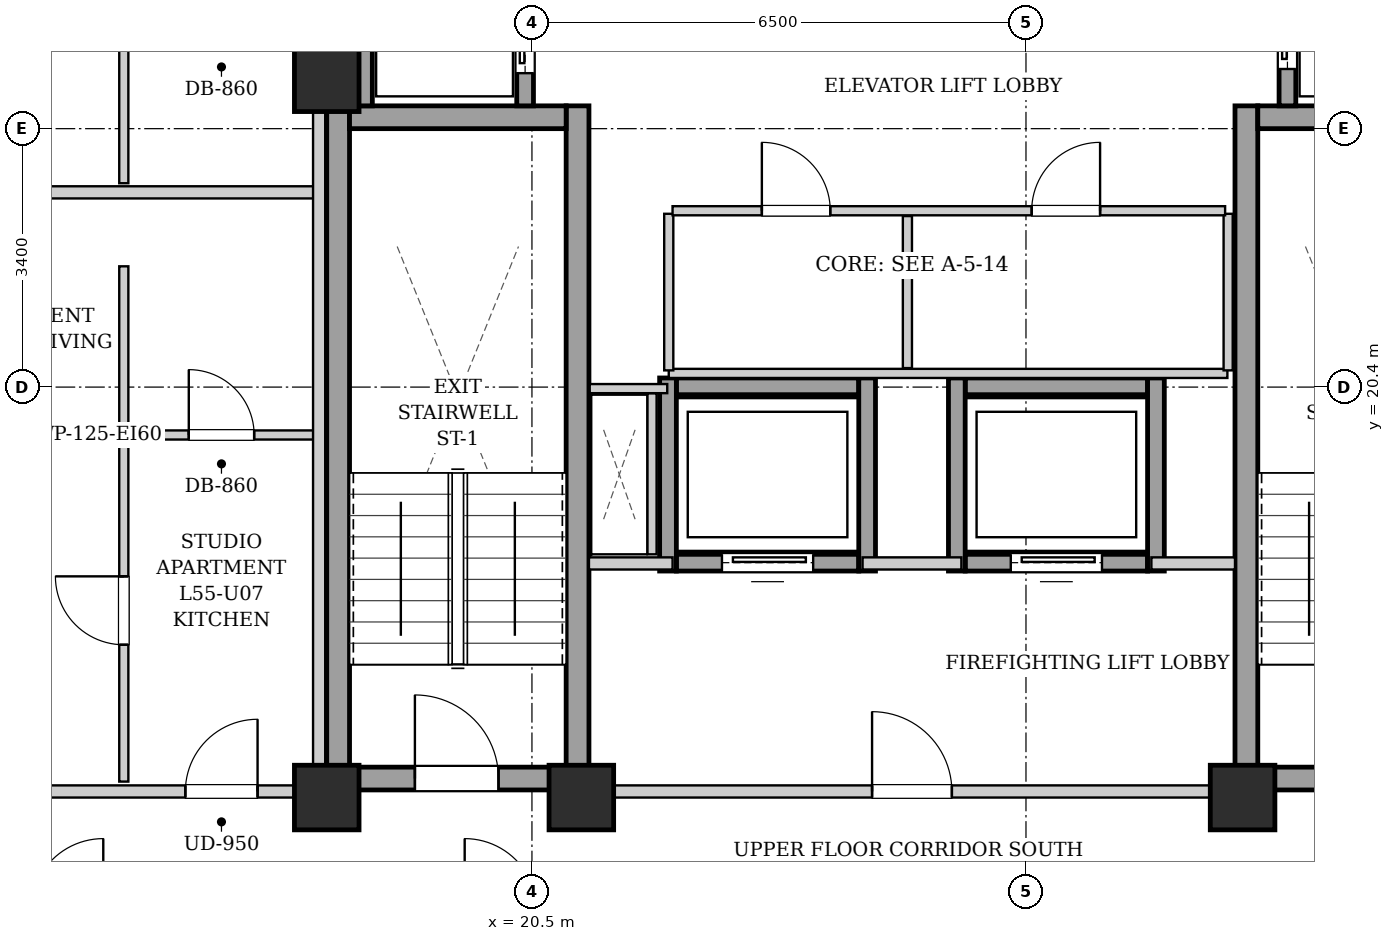
"""IFC4 building model, lengths in metres.
Left out: names, types, materials, properties, quantities, classifications, styles, units other than length and angle.
Written with IfcOpenShell. Run it as: python <this file> out.ifc"""

import sys

from ifc_helpers import new_model, si_unit, direction, frame, frame_2d, origin, origin_2d, place, context, subcontext, project, spatial, rectangle, extrude, element, fill, save


model = new_model("IFC4")
c1 = context("Model", 3, precision=1e-05, world=origin(), true_north=direction((0.0, 1.0)))
c2 = subcontext(c1, "Body", "Model", "MODEL_VIEW")
j1 = project(units=[si_unit("LENGTHUNIT", "METRE"), si_unit("PLANEANGLEUNIT", "RADIAN")], contexts=[c1])
p1 = place(None, origin())
s1 = spatial("IfcSite", under=j1, at=p1, CompositionType="ELEMENT")
p2 = place(p1, origin())
s2 = spatial("IfcBuilding", under=s1, at=p2, CompositionType="ELEMENT")
p3 = place(p2, frame((0.0, 0.0, 190.9)))
s3 = spatial("IfcBuildingStorey", under=s2, at=p3, CompositionType="ELEMENT", Elevation=190.9)
for number, where, z_axis, x_axis in (
    (1, (17.8, 15.0, 0.0), (0.0, 0.0, 1.0), (1.0, 0.0, 0.0)),
    (2, (21.15, 15.0, 0.0), (0.0, 0.0, 1.0), (1.0, 0.0, 0.0)),
    (3, (29.85, 15.0, 0.0), (0.0, 0.0, 1.0), (1.0, 0.0, 0.0)),
    (4, (17.8, 24.45, 0.0), (0.0, 0.0, 1.0), (1.0, 0.0, 0.0)),
):
    element("IfcColumn", number, at=place(p3, frame(where, z_axis=z_axis, x_axis=x_axis)), inside=s3, PredefinedType="COLUMN", context=c2, shape_type="SweptSolid", body=[
        extrude(rectangle(XDim=0.85, YDim=0.85, at=origin_2d()), origin(), (0.0, 0.0, 1.0), 3.3),
    ])
for number, where, z_axis, x_axis in (
    (5, (17.95, 15.1, 0.0), (0.0, 0.0, 1.0), (0.0, 1.0, 0.0)),
    (6, (21.1, 15.1, 0.0), (0.0, 0.0, 1.0), (0.0, 1.0, 0.0)),
):
    element("IfcWall", number, at=place(p3, frame(where, z_axis=z_axis, x_axis=x_axis)), inside=s3, PredefinedType="SHEAR", context=c2, shape_type="SweptSolid", body=[
        extrude(rectangle(XDim=9.0, YDim=0.3, at=frame_2d((4.5, 0.0))), origin(), (0.0, 0.0, 1.0), 3.04),
    ])
p4 = place(p3, frame((18.1, 23.95, 0.0), z_axis=(0.0, 0.0, 1.0), x_axis=(1.0, 0.0, 0.0)))
e7 = element("IfcWall", 7, at=p4, inside=s3, PredefinedType="SHEAR", context=c2, shape_type="SweptSolid", body=[
    extrude(rectangle(XDim=2.85, YDim=0.3, at=frame_2d((1.425, 0.0))), origin(), (0.0, 0.0, 1.0), 3.04),
])
p5 = place(p3, frame((18.1, 15.25, 0.0), z_axis=(0.0, 0.0, 1.0), x_axis=(1.0, 0.0, 0.0)))
e8 = element("IfcWall", 8, at=p5, inside=s3, PredefinedType="SHEAR", context=c2, shape_type="SweptSolid", body=[
    extrude(rectangle(XDim=2.85, YDim=0.3, at=frame_2d((1.425, 0.0))), origin(), (0.0, 0.0, 1.0), 3.04),
])
p6 = place(p5, frame((0.86, 0.0, 0.0)))
e9 = element("IfcOpeningElement", 9, at=p6, cuts=e8, PredefinedType="OPENING", context=c2, shape_type="SweptSolid", body=[
    extrude(rectangle(XDim=1.1, YDim=2.05, at=frame_2d((0.55, 1.025))), frame((0.0, 0.16, 0.0), z_axis=(0.0, -1.0, 0.0), x_axis=(1.0, 0.0, 0.0)), (0.0, 0.0, 1.0), 0.32),
])
p7 = place(p3, frame((29.9, 15.1, 0.0), z_axis=(0.0, 0.0, 1.0), x_axis=(0.0, 1.0, 0.0)))
e10 = element("IfcWall", 10, at=p7, inside=s3, PredefinedType="SHEAR", context=c2, shape_type="SweptSolid", body=[
    extrude(rectangle(XDim=9.0, YDim=0.3, at=frame_2d((4.5, 0.0))), origin(), (0.0, 0.0, 1.0), 3.04),
])
p8 = place(p3, frame((30.05, 23.95, 0.0), z_axis=(0.0, 0.0, 1.0), x_axis=(1.0, 0.0, 0.0)))
e11 = element("IfcWall", 11, at=p8, inside=s3, PredefinedType="SHEAR", context=c2, shape_type="SweptSolid", body=[
    extrude(rectangle(XDim=2.85, YDim=0.3, at=frame_2d((1.425, 0.0))), origin(), (0.0, 0.0, 1.0), 3.04),
])
p9 = place(p3, frame((30.05, 15.25, 0.0), z_axis=(0.0, 0.0, 1.0), x_axis=(1.0, 0.0, 0.0)))
e12 = element("IfcWall", 12, at=p9, inside=s3, PredefinedType="SHEAR", context=c2, shape_type="SweptSolid", body=[
    extrude(rectangle(XDim=2.85, YDim=0.3, at=frame_2d((1.425, 0.0))), origin(), (0.0, 0.0, 1.0), 3.04),
])
p10 = place(p9, frame((0.86, 0.0, 0.0)))
e13 = element("IfcOpeningElement", 13, at=p10, cuts=e12, PredefinedType="OPENING", context=c2, shape_type="SweptSolid", body=[
    extrude(rectangle(XDim=1.1, YDim=2.05, at=frame_2d((0.55, 1.025))), frame((0.0, 0.16, 0.0), z_axis=(0.0, -1.0, 0.0), x_axis=(1.0, 0.0, 0.0)), (0.0, 0.0, 1.0), 0.32),
])
p11 = place(p3, frame((18.29, 24.1, 0.0), z_axis=(0.0, 0.0, 1.0), x_axis=(0.0, 1.0, 0.0)))
e14 = element("IfcWall", 14, at=p11, inside=s3, PredefinedType="SHEAR", context=c2, shape_type="SweptSolid", body=[
    extrude(rectangle(XDim=4.14, YDim=0.22, at=frame_2d((2.07, 0.0))), origin(), (0.0, 0.0, 1.0), 3.04),
])
p12 = place(p3, frame((20.41, 24.1, 0.0), z_axis=(0.0, 0.0, 1.0), x_axis=(0.0, 1.0, 0.0)))
e15 = element("IfcWall", 15, at=p12, inside=s3, PredefinedType="SHEAR", context=c2, shape_type="SweptSolid", body=[
    extrude(rectangle(XDim=1.96, YDim=0.22, at=frame_2d((0.98, 0.0))), origin(), (0.0, 0.0, 1.0), 3.04),
])
p13 = place(p12, frame((0.43, 0.0, 0.0)))
e16 = element("IfcOpeningElement", 16, at=p13, cuts=e15, PredefinedType="OPENING", context=c2, shape_type="SweptSolid", body=[
    extrude(rectangle(XDim=1.1, YDim=2.15, at=frame_2d((0.55, 1.075))), frame((0.0, 0.12, 0.0), z_axis=(0.0, -1.0, 0.0), x_axis=(1.0, 0.0, 0.0)), (0.0, 0.0, 1.0), 0.24),
])
p14 = place(p3, frame((30.44, 24.1, 0.0), z_axis=(0.0, 0.0, 1.0), x_axis=(0.0, 1.0, 0.0)))
e17 = element("IfcWall", 17, at=p14, inside=s3, PredefinedType="SHEAR", context=c2, shape_type="SweptSolid", body=[
    extrude(rectangle(XDim=2.07, YDim=0.22, at=frame_2d((1.035, 0.0))), origin(), (0.0, 0.0, 1.0), 3.04),
])
p15 = place(p14, frame((0.485, 0.0, 0.0)))
e18 = element("IfcOpeningElement", 18, at=p15, cuts=e17, PredefinedType="OPENING", context=c2, shape_type="SweptSolid", body=[
    extrude(rectangle(XDim=1.1, YDim=2.15, at=frame_2d((0.55, 1.075))), frame((0.0, 0.12, 0.0), z_axis=(0.0, -1.0, 0.0), x_axis=(1.0, 0.0, 0.0)), (0.0, 0.0, 1.0), 0.24),
])
p16 = place(p3, frame((22.4, 18.09, 0.0), z_axis=(0.0, 0.0, 1.0), x_axis=(1.0, 0.0, 0.0)))
e19 = element("IfcWall", 19, at=p16, inside=s3, PredefinedType="SHEAR", context=c2, shape_type="SweptSolid", body=[
    extrude(rectangle(XDim=2.4, YDim=0.22, at=frame_2d((1.2, 0.0))), origin(), (0.0, 0.0, 1.0), 3.04),
])
p17 = place(p16, frame((0.6, 0.0, 0.0)))
e20 = element("IfcOpeningElement", 20, at=p17, cuts=e19, PredefinedType="OPENING", context=c2, shape_type="SweptSolid", body=[
    extrude(rectangle(XDim=1.2, YDim=2.15, at=frame_2d((0.6, 1.075))), frame((0.0, 0.12, 0.0), z_axis=(0.0, -1.0, 0.0), x_axis=(1.0, 0.0, 0.0)), (0.0, 0.0, 1.0), 0.24),
])
p18 = place(p3, frame((22.4, 20.41, 0.0), z_axis=(0.0, 0.0, 1.0), x_axis=(1.0, 0.0, 0.0)))
e21 = element("IfcWall", 21, at=p18, inside=s3, PredefinedType="SHEAR", context=c2, shape_type="SweptSolid", body=[
    extrude(rectangle(XDim=2.4, YDim=0.22, at=frame_2d((1.2, 0.0))), origin(), (0.0, 0.0, 1.0), 3.04),
])
for number, where, z_axis, x_axis in (
    (22, (22.29, 17.98, 0.0), (0.0, 0.0, 1.0), (0.0, 1.0, 0.0)),
    (23, (24.91, 17.98, 0.0), (0.0, 0.0, 1.0), (0.0, 1.0, 0.0)),
):
    element("IfcWall", number, at=place(p3, frame(where, z_axis=z_axis, x_axis=x_axis)), inside=s3, PredefinedType="SHEAR", context=c2, shape_type="SweptSolid", body=[
        extrude(rectangle(XDim=2.54, YDim=0.22, at=frame_2d((1.27, 0.0))), origin(), (0.0, 0.0, 1.0), 3.04),
    ])
p19 = place(p3, frame((26.2, 18.09, 0.0), z_axis=(0.0, 0.0, 1.0), x_axis=(1.0, 0.0, 0.0)))
e24 = element("IfcWall", 24, at=p19, inside=s3, PredefinedType="SHEAR", context=c2, shape_type="SweptSolid", body=[
    extrude(rectangle(XDim=2.4, YDim=0.22, at=frame_2d((1.2, 0.0))), origin(), (0.0, 0.0, 1.0), 3.04),
])
p20 = place(p19, frame((0.6, 0.0, 0.0)))
e25 = element("IfcOpeningElement", 25, at=p20, cuts=e24, PredefinedType="OPENING", context=c2, shape_type="SweptSolid", body=[
    extrude(rectangle(XDim=1.2, YDim=2.15, at=frame_2d((0.6, 1.075))), frame((0.0, 0.12, 0.0), z_axis=(0.0, -1.0, 0.0), x_axis=(1.0, 0.0, 0.0)), (0.0, 0.0, 1.0), 0.24),
])
p21 = place(p3, frame((26.2, 20.41, 0.0), z_axis=(0.0, 0.0, 1.0), x_axis=(1.0, 0.0, 0.0)))
e26 = element("IfcWall", 26, at=p21, inside=s3, PredefinedType="SHEAR", context=c2, shape_type="SweptSolid", body=[
    extrude(rectangle(XDim=2.4, YDim=0.22, at=frame_2d((1.2, 0.0))), origin(), (0.0, 0.0, 1.0), 3.04),
])
for number, where, z_axis, x_axis in (
    (27, (26.09, 17.98, 0.0), (0.0, 0.0, 1.0), (0.0, 1.0, 0.0)),
    (28, (28.71, 17.98, 0.0), (0.0, 0.0, 1.0), (0.0, 1.0, 0.0)),
):
    element("IfcWall", number, at=place(p3, frame(where, z_axis=z_axis, x_axis=x_axis)), inside=s3, PredefinedType="SHEAR", context=c2, shape_type="SweptSolid", body=[
        extrude(rectangle(XDim=2.54, YDim=0.22, at=frame_2d((1.27, 0.0))), origin(), (0.0, 0.0, 1.0), 3.04),
    ])
p22 = place(p3, frame((21.25, 15.08, 0.0), z_axis=(0.0, 0.0, 1.0), x_axis=(1.0, 0.0, 0.0)))
e29 = element("IfcWall", 29, at=p22, inside=s3, PredefinedType="PARTITIONING", context=c2, shape_type="SweptSolid", body=[
    extrude(rectangle(XDim=8.5, YDim=0.16, at=frame_2d((4.25, 0.0))), origin(), (0.0, 0.0, 1.0), 2.556),
])
p23 = place(p22, frame((3.725, 0.0, 0.0)))
e30 = element("IfcOpeningElement", 30, at=p23, cuts=e29, PredefinedType="OPENING", context=c2, shape_type="SweptSolid", body=[
    extrude(rectangle(XDim=1.05, YDim=2.05, at=frame_2d((0.525, 1.025))), frame((0.0, 0.09, 0.0), z_axis=(0.0, -1.0, 0.0), x_axis=(1.0, 0.0, 0.0)), (0.0, 0.0, 1.0), 0.18),
])
p24 = place(p3, frame((21.25, 18.08, 0.0), z_axis=(0.0, 0.0, 1.0), x_axis=(1.0, 0.0, 0.0)))
e31 = element("IfcWall", 31, at=p24, inside=s3, PredefinedType="PARTITIONING", context=c2, shape_type="SweptSolid", body=[
    extrude(rectangle(XDim=1.1, YDim=0.16, at=frame_2d((0.55, 0.0))), origin(), (0.0, 0.0, 1.0), 3.04),
])
p25 = place(p3, frame((24.85, 18.08, 0.0), z_axis=(0.0, 0.0, 1.0), x_axis=(1.0, 0.0, 0.0)))
e32 = element("IfcWall", 32, at=p25, inside=s3, PredefinedType="PARTITIONING", context=c2, shape_type="SweptSolid", body=[
    extrude(rectangle(XDim=1.3, YDim=0.16, at=frame_2d((0.65, 0.0))), origin(), (0.0, 0.0, 1.0), 3.04),
])
p26 = place(p3, frame((28.65, 18.08, 0.0), z_axis=(0.0, 0.0, 1.0), x_axis=(1.0, 0.0, 0.0)))
e33 = element("IfcWall", 33, at=p26, inside=s3, PredefinedType="PARTITIONING", context=c2, shape_type="SweptSolid", body=[
    extrude(rectangle(XDim=1.1, YDim=0.16, at=frame_2d((0.55, 0.0))), origin(), (0.0, 0.0, 1.0), 3.04),
])
p27 = place(p3, frame((17.88, 24.12, 0.0), z_axis=(0.0, 0.0, 1.0), x_axis=(0.0, 1.0, 0.0)))
e34 = element("IfcWall", 34, at=p27, inside=s3, PredefinedType="PARTITIONING", context=c2, shape_type="SweptSolid", body=[
    extrude(rectangle(XDim=4.76, YDim=0.16, at=frame_2d((2.38, 0.0))), origin(), (0.0, 0.0, 1.0), 3.04),
])
p28 = place(p3, frame((22.08, 18.2, 0.0), z_axis=(0.0, 0.0, 1.0), x_axis=(0.0, 1.0, 0.0)))
e35 = element("IfcWall", 35, at=p28, inside=s3, PredefinedType="PARTITIONING", context=c2, shape_type="SweptSolid", body=[
    extrude(rectangle(XDim=2.12, YDim=0.12, at=frame_2d((1.06, 0.0))), origin(), (0.0, 0.0, 1.0), 3.04),
])
p29 = place(p3, frame((22.28, 20.38, 0.0), z_axis=(0.0, 0.0, 1.0), x_axis=(-1.0, 0.0, 0.0)))
e36 = element("IfcWall", 36, at=p29, inside=s3, PredefinedType="PARTITIONING", context=c2, shape_type="SweptSolid", body=[
    extrude(rectangle(XDim=1.02, YDim=0.12, at=frame_2d((0.51, 0.0))), origin(), (0.0, 0.0, 1.0), 3.04),
])
p30 = place(p3, frame((22.3, 20.58, 0.0), z_axis=(0.0, 0.0, 1.0), x_axis=(1.0, 0.0, 0.0)))
e37 = element("IfcWall", 37, at=p30, inside=s3, PredefinedType="PARTITIONING", context=c2, shape_type="SweptSolid", body=[
    extrude(rectangle(XDim=7.35, YDim=0.12, at=frame_2d((3.675, 0.0))), origin(), (0.0, 0.0, 1.0), 3.04),
])
for number, where, z_axis, x_axis in (
    (38, (22.3, 20.62, 0.0), (0.0, 0.0, 1.0), (0.0, 1.0, 0.0)),
    (39, (29.66, 20.62, 0.0), (0.0, 0.0, 1.0), (0.0, 1.0, 0.0)),
):
    element("IfcWall", number, at=place(p3, frame(where, z_axis=z_axis, x_axis=x_axis)), inside=s3, PredefinedType="PARTITIONING", context=c2, shape_type="SweptSolid", body=[
        extrude(rectangle(XDim=2.06, YDim=0.12, at=frame_2d((1.03, 0.0))), origin(), (0.0, 0.0, 1.0), 3.04),
    ])
p31 = place(p3, frame((25.44, 20.65, 0.0), z_axis=(0.0, 0.0, 1.0), x_axis=(0.0, 1.0, 0.0)))
e40 = element("IfcWall", 40, at=p31, inside=s3, PredefinedType="PARTITIONING", context=c2, shape_type="SweptSolid", body=[
    extrude(rectangle(XDim=2.0, YDim=0.12, at=frame_2d((1.0, 0.0))), origin(), (0.0, 0.0, 1.0), 3.04),
])
p32 = place(p3, frame((22.35, 22.72, 0.0), z_axis=(0.0, 0.0, 1.0), x_axis=(1.0, 0.0, 0.0)))
e41 = element("IfcWall", 41, at=p32, inside=s3, PredefinedType="PARTITIONING", context=c2, shape_type="SweptSolid", body=[
    extrude(rectangle(XDim=7.27, YDim=0.12, at=frame_2d((3.635, 0.0))), origin(), (0.0, 0.0, 1.0), 3.04),
])
p33 = place(p32, frame((1.175, 0.0, 0.0)))
e42 = element("IfcOpeningElement", 42, at=p33, cuts=e41, PredefinedType="OPENING", context=c2, shape_type="SweptSolid", body=[
    extrude(rectangle(XDim=0.9, YDim=2.05, at=frame_2d((0.45, 1.025))), frame((0.0, 0.07, 0.0), z_axis=(0.0, -1.0, 0.0), x_axis=(1.0, 0.0, 0.0)), (0.0, 0.0, 1.0), 0.14),
])
p34 = place(p32, frame((4.725, 0.0, 0.0)))
e43 = element("IfcOpeningElement", 43, at=p34, cuts=e41, PredefinedType="OPENING", context=c2, shape_type="SweptSolid", body=[
    extrude(rectangle(XDim=0.9, YDim=2.05, at=frame_2d((0.45, 1.025))), frame((0.0, 0.07, 0.0), z_axis=(0.0, -1.0, 0.0), x_axis=(1.0, 0.0, 0.0)), (0.0, 0.0, 1.0), 0.14),
])
p35 = place(p3, frame((10.88, 15.08, 0.0), z_axis=(0.0, 0.0, 1.0), x_axis=(1.0, 0.0, 0.0)))
e44 = element("IfcWall", 44, at=p35, inside=s3, PredefinedType="PARTITIONING", context=c2, shape_type="SweptSolid", body=[
    extrude(rectangle(XDim=6.88, YDim=0.16, at=frame_2d((3.44, 0.0))), origin(), (0.0, 0.0, 1.0), 2.556),
])
p36 = place(p35, frame((5.06, 0.0, 0.0)))
e45 = element("IfcOpeningElement", 45, at=p36, cuts=e44, PredefinedType="OPENING", context=c2, shape_type="SweptSolid", body=[
    extrude(rectangle(XDim=0.95, YDim=2.1, at=frame_2d((0.475, 1.05))), frame((0.0, 0.09, 0.0), z_axis=(0.0, -1.0, 0.0), x_axis=(1.0, 0.0, 0.0)), (0.0, 0.0, 1.0), 0.18),
])
p37 = place(p3, frame((10.88, 22.962, 0.0), z_axis=(0.0, 0.0, 1.0), x_axis=(1.0, 0.0, 0.0)))
e46 = element("IfcWall", 46, at=p37, inside=s3, PredefinedType="PARTITIONING", context=c2, shape_type="SweptSolid", body=[
    extrude(rectangle(XDim=6.76, YDim=0.16, at=frame_2d((3.38, 0.0))), origin(), (0.0, 0.0, 1.0), 3.04),
])
p38 = place(p3, frame((15.19, 19.77, 0.0), z_axis=(0.0, 0.0, 1.0), x_axis=(1.0, 0.0, 0.0)))
e47 = element("IfcWall", 47, at=p38, inside=s3, PredefinedType="PARTITIONING", context=c2, shape_type="SweptSolid", body=[
    extrude(rectangle(XDim=2.45, YDim=0.12, at=frame_2d((1.225, 0.0))), origin(), (0.0, 0.0, 1.0), 3.04),
])
p39 = place(p38, frame((0.795, 0.0, 0.0)))
e48 = element("IfcOpeningElement", 48, at=p39, cuts=e47, PredefinedType="OPENING", context=c2, shape_type="SweptSolid", body=[
    extrude(rectangle(XDim=0.86, YDim=2.05, at=frame_2d((0.43, 1.025))), frame((0.0, 0.07, 0.0), z_axis=(0.0, -1.0, 0.0), x_axis=(1.0, 0.0, 0.0)), (0.0, 0.0, 1.0), 0.14),
])
p40 = place(p3, frame((15.13, 19.83, 0.0), z_axis=(0.0, 0.0, 1.0), x_axis=(0.0, 1.0, 0.0)))
e49 = element("IfcWall", 49, at=p40, inside=s3, PredefinedType="PARTITIONING", context=c2, shape_type="SweptSolid", body=[
    extrude(rectangle(XDim=2.159, YDim=0.12, at=frame_2d((1.08, 0.0))), origin(), (0.0, 0.0, 1.0), 3.04),
])
p41 = place(p3, frame((15.13, 15.21, 0.0), z_axis=(0.0, 0.0, 1.0), x_axis=(0.0, 1.0, 0.0)))
e50 = element("IfcWall", 50, at=p41, inside=s3, PredefinedType="PARTITIONING", context=c2, shape_type="SweptSolid", body=[
    extrude(rectangle(XDim=4.5, YDim=0.12, at=frame_2d((2.25, 0.0))), origin(), (0.0, 0.0, 1.0), 3.04),
])
p42 = place(p41, frame((1.8, 0.0, 0.0)))
e51 = element("IfcOpeningElement", 51, at=p42, cuts=e50, PredefinedType="OPENING", context=c2, shape_type="SweptSolid", body=[
    extrude(rectangle(XDim=0.9, YDim=2.05, at=frame_2d((0.45, 1.025))), frame((0.0, 0.07, 0.0), z_axis=(0.0, -1.0, 0.0), x_axis=(1.0, 0.0, 0.0)), (0.0, 0.0, 1.0), 0.14),
])
p43 = place(p3, frame((15.13, 23.082, 0.0), z_axis=(0.0, 0.0, 1.0), x_axis=(0.0, 1.0, 0.0)))
e52 = element("IfcWall", 52, at=p43, inside=s3, PredefinedType="PARTITIONING", context=c2, shape_type="SweptSolid", body=[
    extrude(rectangle(XDim=1.85, YDim=0.12, at=frame_2d((0.925, 0.0))), origin(), (0.0, 0.0, 1.0), 3.04),
])
p44 = place(p3, frame((17.7, 15.02, 0.0), z_axis=(0.0, 0.0, 1.0), x_axis=(0.0, 1.0, 0.0)))
e53 = element("IfcWall", 53, at=p44, inside=s3, PredefinedType="PARTITIONING", context=c2, shape_type="SweptSolid", body=[
    extrude(rectangle(XDim=13.98, YDim=0.16, at=frame_2d((6.99, 0.0))), origin(), (0.0, 0.0, 1.0), 3.04),
])
p45 = place(p6, origin())
e54 = element("IfcDoor", 54, at=p45, inside=s3, OperationType="SINGLE_SWING_LEFT", PredefinedType="DOOR", context=c2, shape_type="SweptSolid", body=[
    extrude(rectangle(XDim=1.1, YDim=2.05, at=frame_2d((0.55, 1.025))), frame((0.0, 0.025, 0.0), z_axis=(0.0, -1.0, 0.0), x_axis=(1.0, 0.0, 0.0)), (0.0, 0.0, 1.0), 0.05),
])
fill(e9, e54)
p46 = place(p13, origin())
e55 = element("IfcDoor", 55, at=p46, inside=s3, OperationType="SLIDING_TO_LEFT", PredefinedType="DOOR", context=c2, shape_type="SweptSolid", body=[
    extrude(rectangle(XDim=1.1, YDim=2.15, at=frame_2d((0.55, 1.075))), frame((0.0, 0.025, 0.0), z_axis=(0.0, -1.0, 0.0), x_axis=(1.0, 0.0, 0.0)), (0.0, 0.0, 1.0), 0.05),
])
fill(e16, e55)
p47 = place(p15, origin())
e56 = element("IfcDoor", 56, at=p47, inside=s3, OperationType="SLIDING_TO_LEFT", PredefinedType="DOOR", context=c2, shape_type="SweptSolid", body=[
    extrude(rectangle(XDim=1.1, YDim=2.15, at=frame_2d((0.55, 1.075))), frame((0.0, 0.025, 0.0), z_axis=(0.0, -1.0, 0.0), x_axis=(1.0, 0.0, 0.0)), (0.0, 0.0, 1.0), 0.05),
])
fill(e18, e56)
p48 = place(p17, origin())
e57 = element("IfcDoor", 57, at=p48, inside=s3, OperationType="SLIDING_TO_LEFT", PredefinedType="DOOR", context=c2, shape_type="SweptSolid", body=[
    extrude(rectangle(XDim=1.2, YDim=2.15, at=frame_2d((0.6, 1.075))), frame((0.0, 0.025, 0.0), z_axis=(0.0, -1.0, 0.0), x_axis=(1.0, 0.0, 0.0)), (0.0, 0.0, 1.0), 0.05),
])
fill(e20, e57)
p49 = place(p20, origin())
e58 = element("IfcDoor", 58, at=p49, inside=s3, OperationType="SLIDING_TO_LEFT", PredefinedType="DOOR", context=c2, shape_type="SweptSolid", body=[
    extrude(rectangle(XDim=1.2, YDim=2.15, at=frame_2d((0.6, 1.075))), frame((0.0, 0.025, 0.0), z_axis=(0.0, -1.0, 0.0), x_axis=(1.0, 0.0, 0.0)), (0.0, 0.0, 1.0), 0.05),
])
fill(e25, e58)
p50 = place(p23, origin())
e59 = element("IfcDoor", 59, at=p50, inside=s3, OperationType="SINGLE_SWING_LEFT", PredefinedType="DOOR", context=c2, shape_type="SweptSolid", body=[
    extrude(rectangle(XDim=1.05, YDim=2.05, at=frame_2d((0.525, 1.025))), frame((0.0, 0.025, 0.0), z_axis=(0.0, -1.0, 0.0), x_axis=(1.0, 0.0, 0.0)), (0.0, 0.0, 1.0), 0.05),
])
fill(e30, e59)
p51 = place(p33, origin())
e60 = element("IfcDoor", 60, at=p51, inside=s3, OperationType="SINGLE_SWING_LEFT", PredefinedType="DOOR", context=c2, shape_type="SweptSolid", body=[
    extrude(rectangle(XDim=0.9, YDim=2.05, at=frame_2d((0.45, 1.025))), frame((0.0, 0.025, 0.0), z_axis=(0.0, -1.0, 0.0), x_axis=(1.0, 0.0, 0.0)), (0.0, 0.0, 1.0), 0.05),
])
fill(e42, e60)
p52 = place(p34, origin())
e61 = element("IfcDoor", 61, at=p52, inside=s3, OperationType="SINGLE_SWING_RIGHT", PredefinedType="DOOR", context=c2, shape_type="SweptSolid", body=[
    extrude(rectangle(XDim=0.9, YDim=2.05, at=frame_2d((0.45, 1.025))), frame((0.0, 0.025, 0.0), z_axis=(0.0, -1.0, 0.0), x_axis=(1.0, 0.0, 0.0)), (0.0, 0.0, 1.0), 0.05),
])
fill(e43, e61)
p53 = place(p36, origin())
e62 = element("IfcDoor", 62, at=p53, inside=s3, OperationType="SINGLE_SWING_RIGHT", PredefinedType="DOOR", context=c2, shape_type="SweptSolid", body=[
    extrude(rectangle(XDim=0.95, YDim=2.1, at=frame_2d((0.475, 1.05))), frame((0.0, 0.025, 0.0), z_axis=(0.0, -1.0, 0.0), x_axis=(1.0, 0.0, 0.0)), (0.0, 0.0, 1.0), 0.05),
])
fill(e45, e62)
p54 = place(p39, origin())
e63 = element("IfcDoor", 63, at=p54, inside=s3, OperationType="SINGLE_SWING_LEFT", PredefinedType="DOOR", context=c2, shape_type="SweptSolid", body=[
    extrude(rectangle(XDim=0.86, YDim=2.05, at=frame_2d((0.43, 1.025))), frame((0.0, 0.025, 0.0), z_axis=(0.0, -1.0, 0.0), x_axis=(1.0, 0.0, 0.0)), (0.0, 0.0, 1.0), 0.05),
])
fill(e48, e63)
p55 = place(p42, origin())
e64 = element("IfcDoor", 64, at=p55, inside=s3, OperationType="SINGLE_SWING_RIGHT", PredefinedType="DOOR", context=c2, shape_type="SweptSolid", body=[
    extrude(rectangle(XDim=0.9, YDim=2.05, at=frame_2d((0.45, 1.025))), frame((0.0, 0.025, 0.0), z_axis=(0.0, -1.0, 0.0), x_axis=(1.0, 0.0, 0.0)), (0.0, 0.0, 1.0), 0.05),
])
fill(e51, e64)
save(model, sys.argv[1])
